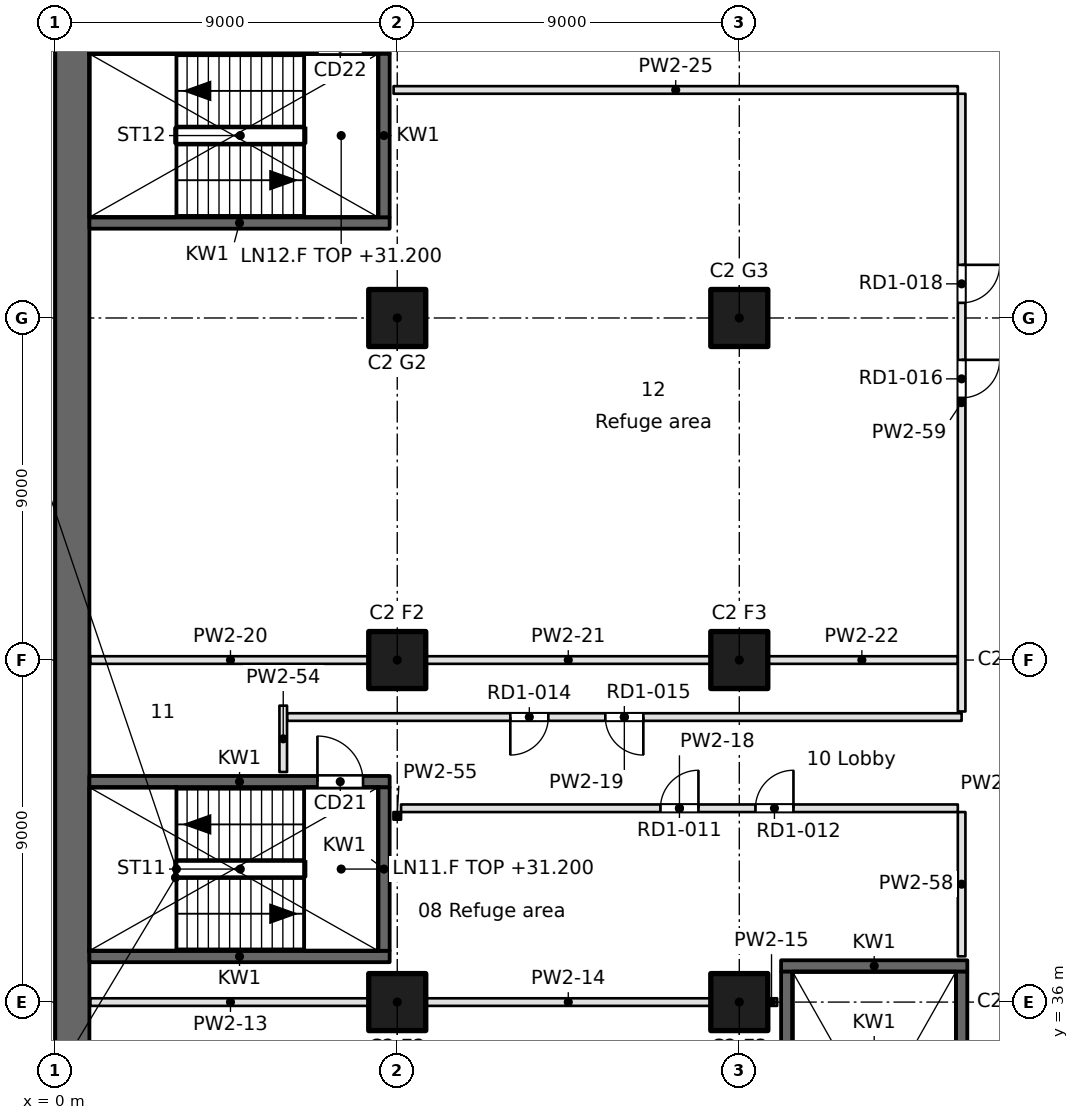
"""IFC4 building model, lengths in metres.
Left out: names, types, materials, properties, quantities, classifications, styles, units other than length and angle.
Written with IfcOpenShell. Run it as: python <this file> out.ifc"""

import sys

from ifc_helpers import new_model, si_unit, direction, frame, frame_2d, origin, origin_2d, place, context, subcontext, project, spatial, rectangle, extrude, element, fill, save


model = new_model("IFC4")
c1 = context("Model", 3, precision=1e-05, world=origin(), true_north=direction((0.0, 1.0)))
c2 = subcontext(c1, "Body", "Model", "MODEL_VIEW")
j1 = project(units=[si_unit("LENGTHUNIT", "METRE"), si_unit("PLANEANGLEUNIT", "RADIAN")], contexts=[c1])
p1 = place(None, origin())
s1 = spatial("IfcSite", under=j1, at=p1, CompositionType="ELEMENT")
p2 = place(p1, origin())
s2 = spatial("IfcBuilding", under=s1, at=p2, CompositionType="ELEMENT")
p3 = place(p2, frame((0.0, 0.0, 31.2)))
s3 = spatial("IfcBuildingStorey", under=s2, at=p3, CompositionType="ELEMENT", Elevation=31.2)
for number, where, z_axis, x_axis in (
    (1, (9.0, 36.0, 0.0), (0.0, 0.0, 1.0), (1.0, 0.0, 0.0)),
    (2, (9.0, 45.0, 0.0), (0.0, 0.0, 1.0), (1.0, 0.0, 0.0)),
    (3, (9.0, 54.0, 0.0), (0.0, 0.0, 1.0), (1.0, 0.0, 0.0)),
    (4, (18.0, 36.0, 0.0), (0.0, 0.0, 1.0), (1.0, 0.0, 0.0)),
    (5, (18.0, 45.0, 0.0), (0.0, 0.0, 1.0), (1.0, 0.0, 0.0)),
    (6, (18.0, 54.0, 0.0), (0.0, 0.0, 1.0), (1.0, 0.0, 0.0)),
):
    element("IfcColumn", number, at=place(p3, frame(where, z_axis=z_axis, x_axis=x_axis)), inside=s3, PredefinedType="COLUMN", context=c2, shape_type="SweptSolid", body=[
        extrude(rectangle(XDim=1.5, YDim=1.5, at=origin_2d()), origin(), (0.0, 0.0, 1.0), 4.6),
    ])
p4 = place(p3, frame((0.45, 94.5, 0.0), z_axis=(0.0, 0.0, 1.0), x_axis=(0.0, -1.0, 0.0)))
e7 = element("IfcWall", 7, at=p4, inside=s3, PredefinedType="SHEAR", context=c2, shape_type="SweptSolid", body=[
    extrude(rectangle(XDim=66.085, YDim=0.9, at=frame_2d((33.042, 0.0))), origin(), (0.0, 0.0, 1.0), 4.6),
])
p5 = place(p3, frame((19.1, 36.95, -0.45), z_axis=(0.0, 0.0, 1.0), x_axis=(1.0, 0.0, 0.0)))
e8 = element("IfcWall", 8, at=p5, inside=s3, PredefinedType="SOLIDWALL", context=c2, shape_type="SweptSolid", body=[
    extrude(rectangle(XDim=4.9, YDim=0.3, at=frame_2d((2.45, 0.0))), origin(), (0.0, 0.0, 1.0), 4.65),
])
p6 = place(p3, frame((0.9, 37.2, -0.45), z_axis=(0.0, 0.0, 1.0), x_axis=(1.0, 0.0, 0.0)))
e9 = element("IfcWall", 9, at=p6, inside=s3, PredefinedType="SOLIDWALL", context=c2, shape_type="SweptSolid", body=[
    extrude(rectangle(XDim=7.9, YDim=0.3, at=frame_2d((3.95, 0.0))), origin(), (0.0, 0.0, 1.0), 4.65),
])
p7 = place(p3, frame((0.9, 41.8, -0.45), z_axis=(0.0, 0.0, 1.0), x_axis=(1.0, 0.0, 0.0)))
e10 = element("IfcWall", 10, at=p7, inside=s3, PredefinedType="SOLIDWALL", context=c2, shape_type="SweptSolid", body=[
    extrude(rectangle(XDim=7.9, YDim=0.3, at=frame_2d((3.95, 0.0))), origin(), (0.0, 0.0, 1.0), 4.65),
])
p8 = place(p7, frame((6.0, 0.0, 0.45)))
e11 = element("IfcOpeningElement", 11, at=p8, cuts=e10, PredefinedType="OPENING", context=c2, shape_type="SweptSolid", body=[
    extrude(rectangle(XDim=1.2, YDim=2.1, at=frame_2d((0.6, 1.05))), frame((0.0, 0.15, 0.0), z_axis=(0.0, -1.0, 0.0), x_axis=(1.0, 0.0, 0.0)), (0.0, 0.0, 1.0), 0.3),
])
p9 = place(p3, frame((0.9, 56.5, -0.45), z_axis=(0.0, 0.0, 1.0), x_axis=(1.0, 0.0, 0.0)))
e12 = element("IfcWall", 12, at=p9, inside=s3, PredefinedType="SOLIDWALL", context=c2, shape_type="SweptSolid", body=[
    extrude(rectangle(XDim=7.9, YDim=0.3, at=frame_2d((3.95, 0.0))), origin(), (0.0, 0.0, 1.0), 4.65),
])
p10 = place(p3, frame((0.9, 61.1, -0.45), z_axis=(0.0, 0.0, 1.0), x_axis=(1.0, 0.0, 0.0)))
e13 = element("IfcWall", 13, at=p10, inside=s3, PredefinedType="SOLIDWALL", context=c2, shape_type="SweptSolid", body=[
    extrude(rectangle(XDim=7.9, YDim=0.3, at=frame_2d((3.95, 0.0))), origin(), (0.0, 0.0, 1.0), 4.65),
])
p11 = place(p10, frame((6.0, 0.0, 0.45)))
e14 = element("IfcOpeningElement", 14, at=p11, cuts=e13, PredefinedType="OPENING", context=c2, shape_type="SweptSolid", body=[
    extrude(rectangle(XDim=1.2, YDim=2.1, at=frame_2d((0.6, 1.05))), frame((0.0, 0.15, 0.0), z_axis=(0.0, -1.0, 0.0), x_axis=(1.0, 0.0, 0.0)), (0.0, 0.0, 1.0), 0.3),
])
p12 = place(p3, frame((8.65, 37.35, -0.45), z_axis=(0.0, 0.0, 1.0), x_axis=(0.0, 1.0, 0.0)))
e15 = element("IfcWall", 15, at=p12, inside=s3, PredefinedType="SOLIDWALL", context=c2, shape_type="SweptSolid", body=[
    extrude(rectangle(XDim=4.3, YDim=0.3, at=frame_2d((2.15, 0.0))), origin(), (0.0, 0.0, 1.0), 4.65),
])
p13 = place(p3, frame((8.65, 56.65, -0.45), z_axis=(0.0, 0.0, 1.0), x_axis=(0.0, 1.0, 0.0)))
e16 = element("IfcWall", 16, at=p13, inside=s3, PredefinedType="SOLIDWALL", context=c2, shape_type="SweptSolid", body=[
    extrude(rectangle(XDim=4.3, YDim=0.3, at=frame_2d((2.15, 0.0))), origin(), (0.0, 0.0, 1.0), 4.65),
])
p14 = place(p3, frame((19.25, 29.2, -0.45), z_axis=(0.0, 0.0, 1.0), x_axis=(0.0, 1.0, 0.0)))
e17 = element("IfcWall", 17, at=p14, inside=s3, PredefinedType="SOLIDWALL", context=c2, shape_type="SweptSolid", body=[
    extrude(rectangle(XDim=7.6, YDim=0.3, at=frame_2d((3.8, 0.0))), origin(), (0.0, 0.0, 1.0), 4.65),
])
p15 = place(p3, frame((23.85, 29.2, -0.45), z_axis=(0.0, 0.0, 1.0), x_axis=(0.0, 1.0, 0.0)))
e18 = element("IfcWall", 18, at=p15, inside=s3, PredefinedType="SOLIDWALL", context=c2, shape_type="SweptSolid", body=[
    extrude(rectangle(XDim=7.6, YDim=0.3, at=frame_2d((3.8, 0.0))), origin(), (0.0, 0.0, 1.0), 4.65),
])
p16 = place(p15, frame((0.375, 0.0, 0.45)))
e19 = element("IfcOpeningElement", 19, at=p16, cuts=e18, PredefinedType="OPENING", context=c2, shape_type="SweptSolid", body=[
    extrude(rectangle(XDim=1.2, YDim=2.1, at=frame_2d((0.6, 1.05))), frame((0.0, 0.15, 0.0), z_axis=(0.0, -1.0, 0.0), x_axis=(1.0, 0.0, 0.0)), (0.0, 0.0, 1.0), 0.3),
])
p17 = place(p3, frame((0.924, 36.0, 0.0), z_axis=(0.0, 0.0, 1.0), x_axis=(1.0, 0.0, 0.0)))
e20 = element("IfcWall", 20, at=p17, inside=s3, PredefinedType="PARTITIONING", context=c2, shape_type="SweptSolid", body=[
    extrude(rectangle(XDim=7.376, YDim=0.2, at=frame_2d((3.688, 0.0))), origin(), (0.0, 0.0, 1.0), 4.2),
])
p18 = place(p3, frame((9.7, 36.0, 0.0), z_axis=(0.0, 0.0, 1.0), x_axis=(1.0, 0.0, 0.0)))
e21 = element("IfcWall", 21, at=p18, inside=s3, PredefinedType="PARTITIONING", context=c2, shape_type="SweptSolid", body=[
    extrude(rectangle(XDim=7.6, YDim=0.2, at=frame_2d((3.8, 0.0))), origin(), (0.0, 0.0, 1.0), 4.2),
])
p19 = place(p3, frame((18.7, 36.0, 0.0), z_axis=(0.0, 0.0, 1.0), x_axis=(1.0, 0.0, 0.0)))
e22 = element("IfcWall", 22, at=p19, inside=s3, PredefinedType="PARTITIONING", context=c2, shape_type="SweptSolid", body=[
    extrude(rectangle(XDim=0.296, YDim=0.2, at=frame_2d((0.148, 0.0))), origin(), (0.0, 0.0, 1.0), 4.2),
])
p20 = place(p3, frame((23.75, 41.1, 0.0), z_axis=(0.0, 0.0, 1.0), x_axis=(-1.0, 0.0, 0.0)))
e23 = element("IfcWall", 23, at=p20, inside=s3, PredefinedType="PARTITIONING", context=c2, shape_type="SweptSolid", body=[
    extrude(rectangle(XDim=14.65, YDim=0.2, at=frame_2d((7.325, 0.0))), origin(), (0.0, 0.0, 1.0), 4.2),
])
p21 = place(p20, frame((6.825, 0.0, 0.0)))
e24 = element("IfcOpeningElement", 24, at=p21, cuts=e23, PredefinedType="OPENING", context=c2, shape_type="SweptSolid", body=[
    extrude(rectangle(XDim=1.0, YDim=2.1, at=frame_2d((0.5, 1.05))), frame((0.0, 0.1, 0.0), z_axis=(0.0, -1.0, 0.0), x_axis=(1.0, 0.0, 0.0)), (0.0, 0.0, 1.0), 0.2),
])
p22 = place(p20, frame((4.325, 0.0, 0.0)))
e25 = element("IfcOpeningElement", 25, at=p22, cuts=e23, PredefinedType="OPENING", context=c2, shape_type="SweptSolid", body=[
    extrude(rectangle(XDim=1.0, YDim=2.1, at=frame_2d((0.5, 1.05))), frame((0.0, 0.1, 0.0), z_axis=(0.0, -1.0, 0.0), x_axis=(1.0, 0.0, 0.0)), (0.0, 0.0, 1.0), 0.2),
])
p23 = place(p3, frame((6.1, 43.5, 0.0), z_axis=(0.0, 0.0, 1.0), x_axis=(1.0, 0.0, 0.0)))
e26 = element("IfcWall", 26, at=p23, inside=s3, PredefinedType="PARTITIONING", context=c2, shape_type="SweptSolid", body=[
    extrude(rectangle(XDim=17.75, YDim=0.2, at=frame_2d((8.875, 0.0))), origin(), (0.0, 0.0, 1.0), 4.2),
])
p24 = place(p23, frame((5.875, 0.0, 0.0)))
e27 = element("IfcOpeningElement", 27, at=p24, cuts=e26, PredefinedType="OPENING", context=c2, shape_type="SweptSolid", body=[
    extrude(rectangle(XDim=1.0, YDim=2.1, at=frame_2d((0.5, 1.05))), frame((0.0, 0.1, 0.0), z_axis=(0.0, -1.0, 0.0), x_axis=(1.0, 0.0, 0.0)), (0.0, 0.0, 1.0), 0.2),
])
p25 = place(p23, frame((8.375, 0.0, 0.0)))
e28 = element("IfcOpeningElement", 28, at=p25, cuts=e26, PredefinedType="OPENING", context=c2, shape_type="SweptSolid", body=[
    extrude(rectangle(XDim=1.0, YDim=2.1, at=frame_2d((0.5, 1.05))), frame((0.0, 0.1, 0.0), z_axis=(0.0, -1.0, 0.0), x_axis=(1.0, 0.0, 0.0)), (0.0, 0.0, 1.0), 0.2),
])
p26 = place(p3, frame((0.924, 45.0, 0.0), z_axis=(0.0, 0.0, 1.0), x_axis=(1.0, 0.0, 0.0)))
e29 = element("IfcWall", 29, at=p26, inside=s3, PredefinedType="PARTITIONING", context=c2, shape_type="SweptSolid", body=[
    extrude(rectangle(XDim=7.376, YDim=0.2, at=frame_2d((3.688, 0.0))), origin(), (0.0, 0.0, 1.0), 4.2),
])
p27 = place(p3, frame((9.7, 45.0, 0.0), z_axis=(0.0, 0.0, 1.0), x_axis=(1.0, 0.0, 0.0)))
e30 = element("IfcWall", 30, at=p27, inside=s3, PredefinedType="PARTITIONING", context=c2, shape_type="SweptSolid", body=[
    extrude(rectangle(XDim=7.6, YDim=0.2, at=frame_2d((3.8, 0.0))), origin(), (0.0, 0.0, 1.0), 4.2),
])
p28 = place(p3, frame((18.7, 45.0, 0.0), z_axis=(0.0, 0.0, 1.0), x_axis=(1.0, 0.0, 0.0)))
e31 = element("IfcWall", 31, at=p28, inside=s3, PredefinedType="PARTITIONING", context=c2, shape_type="SweptSolid", body=[
    extrude(rectangle(XDim=5.05, YDim=0.2, at=frame_2d((2.525, 0.0))), origin(), (0.0, 0.0, 1.0), 4.2),
])
p29 = place(p3, frame((23.75, 60.0, 0.0), z_axis=(0.0, 0.0, 1.0), x_axis=(-1.0, 0.0, 0.0)))
e32 = element("IfcWall", 32, at=p29, inside=s3, PredefinedType="PARTITIONING", context=c2, shape_type="SweptSolid", body=[
    extrude(rectangle(XDim=14.846, YDim=0.2, at=frame_2d((7.423, 0.0))), origin(), (0.0, 0.0, 1.0), 4.2),
])
p30 = place(p3, frame((6.0, 42.054, 0.0), z_axis=(0.0, 0.0, 1.0), x_axis=(0.0, 1.0, 0.0)))
e33 = element("IfcWall", 33, at=p30, inside=s3, PredefinedType="PARTITIONING", context=c2, shape_type="SweptSolid", body=[
    extrude(rectangle(XDim=1.746, YDim=0.2, at=frame_2d((0.873, 0.0))), origin(), (0.0, 0.0, 1.0), 4.2),
])
p31 = place(p3, frame((9.0, 41.0, 0.0), z_axis=(0.0, 0.0, 1.0), x_axis=(0.0, -1.0, 0.0)))
e34 = element("IfcWall", 34, at=p31, inside=s3, PredefinedType="PARTITIONING", context=c2, shape_type="SweptSolid", body=[
    extrude(rectangle(XDim=0.2, YDim=0.2, at=frame_2d((0.1, 0.0))), origin(), (0.0, 0.0, 1.0), 4.2),
])
p32 = place(p3, frame((23.85, 37.204, 0.0), z_axis=(0.0, 0.0, 1.0), x_axis=(0.0, 1.0, 0.0)))
e35 = element("IfcWall", 35, at=p32, inside=s3, PredefinedType="PARTITIONING", context=c2, shape_type="SweptSolid", body=[
    extrude(rectangle(XDim=3.796, YDim=0.2, at=frame_2d((1.898, 0.0))), origin(), (0.0, 0.0, 1.0), 4.2),
])
p33 = place(p3, frame((23.85, 43.646, 0.0), z_axis=(0.0, 0.0, 1.0), x_axis=(0.0, 1.0, 0.0)))
e36 = element("IfcWall", 36, at=p33, inside=s3, PredefinedType="PARTITIONING", context=c2, shape_type="SweptSolid", body=[
    extrude(rectangle(XDim=16.254, YDim=0.2, at=frame_2d((8.127, 0.0))), origin(), (0.0, 0.0, 1.0), 4.2),
])
p34 = place(p33, frame((8.252, 0.0, 0.0)))
e37 = element("IfcOpeningElement", 37, at=p34, cuts=e36, PredefinedType="OPENING", context=c2, shape_type="SweptSolid", body=[
    extrude(rectangle(XDim=1.0, YDim=2.1, at=frame_2d((0.5, 1.05))), frame((0.0, 0.1, 0.0), z_axis=(0.0, -1.0, 0.0), x_axis=(1.0, 0.0, 0.0)), (0.0, 0.0, 1.0), 0.2),
])
p35 = place(p33, frame((10.752, 0.0, 0.0)))
e38 = element("IfcOpeningElement", 38, at=p35, cuts=e36, PredefinedType="OPENING", context=c2, shape_type="SweptSolid", body=[
    extrude(rectangle(XDim=1.0, YDim=2.1, at=frame_2d((0.5, 1.05))), frame((0.0, 0.1, 0.0), z_axis=(0.0, -1.0, 0.0), x_axis=(1.0, 0.0, 0.0)), (0.0, 0.0, 1.0), 0.2),
])
p36 = place(p8, origin())
e39 = element("IfcDoor", 39, at=p36, inside=s3, OperationType="SINGLE_SWING_LEFT", PredefinedType="DOOR", context=c2, shape_type="SweptSolid", body=[
    extrude(rectangle(XDim=1.2, YDim=2.1, at=frame_2d((0.6, 1.05))), frame((0.0, 0.025, 0.0), z_axis=(0.0, -1.0, 0.0), x_axis=(1.0, 0.0, 0.0)), (0.0, 0.0, 1.0), 0.05),
])
fill(e11, e39)
p37 = place(p21, frame((1.0, 0.0, 0.0), z_axis=(0.0, 0.0, 1.0), x_axis=(-1.0, 0.0, 0.0)))
e40 = element("IfcDoor", 40, at=p37, inside=s3, OperationType="SINGLE_SWING_RIGHT", PredefinedType="DOOR", context=c2, shape_type="SweptSolid", body=[
    extrude(rectangle(XDim=1.0, YDim=2.1, at=frame_2d((0.5, 1.05))), frame((0.0, 0.025, 0.0), z_axis=(0.0, -1.0, 0.0), x_axis=(1.0, 0.0, 0.0)), (0.0, 0.0, 1.0), 0.05),
])
fill(e24, e40)
p38 = place(p22, frame((1.0, 0.0, 0.0), z_axis=(0.0, 0.0, 1.0), x_axis=(-1.0, 0.0, 0.0)))
e41 = element("IfcDoor", 41, at=p38, inside=s3, OperationType="SINGLE_SWING_RIGHT", PredefinedType="DOOR", context=c2, shape_type="SweptSolid", body=[
    extrude(rectangle(XDim=1.0, YDim=2.1, at=frame_2d((0.5, 1.05))), frame((0.0, 0.025, 0.0), z_axis=(0.0, -1.0, 0.0), x_axis=(1.0, 0.0, 0.0)), (0.0, 0.0, 1.0), 0.05),
])
fill(e25, e41)
p39 = place(p24, frame((1.0, 0.0, 0.0), z_axis=(0.0, 0.0, 1.0), x_axis=(-1.0, 0.0, 0.0)))
e42 = element("IfcDoor", 42, at=p39, inside=s3, OperationType="SINGLE_SWING_RIGHT", PredefinedType="DOOR", context=c2, shape_type="SweptSolid", body=[
    extrude(rectangle(XDim=1.0, YDim=2.1, at=frame_2d((0.5, 1.05))), frame((0.0, 0.025, 0.0), z_axis=(0.0, -1.0, 0.0), x_axis=(1.0, 0.0, 0.0)), (0.0, 0.0, 1.0), 0.05),
])
fill(e27, e42)
p40 = place(p25, frame((1.0, 0.0, 0.0), z_axis=(0.0, 0.0, 1.0), x_axis=(-1.0, 0.0, 0.0)))
e43 = element("IfcDoor", 43, at=p40, inside=s3, OperationType="SINGLE_SWING_LEFT", PredefinedType="DOOR", context=c2, shape_type="SweptSolid", body=[
    extrude(rectangle(XDim=1.0, YDim=2.1, at=frame_2d((0.5, 1.05))), frame((0.0, 0.025, 0.0), z_axis=(0.0, -1.0, 0.0), x_axis=(1.0, 0.0, 0.0)), (0.0, 0.0, 1.0), 0.05),
])
fill(e28, e43)
p41 = place(p34, frame((1.0, 0.0, 0.0), z_axis=(0.0, 0.0, 1.0), x_axis=(-1.0, 0.0, 0.0)))
e44 = element("IfcDoor", 44, at=p41, inside=s3, OperationType="SINGLE_SWING_LEFT", PredefinedType="DOOR", context=c2, shape_type="SweptSolid", body=[
    extrude(rectangle(XDim=1.0, YDim=2.1, at=frame_2d((0.5, 1.05))), frame((0.0, 0.025, 0.0), z_axis=(0.0, -1.0, 0.0), x_axis=(1.0, 0.0, 0.0)), (0.0, 0.0, 1.0), 0.05),
])
fill(e37, e44)
p42 = place(p35, frame((1.0, 0.0, 0.0), z_axis=(0.0, 0.0, 1.0), x_axis=(-1.0, 0.0, 0.0)))
e45 = element("IfcDoor", 45, at=p42, inside=s3, OperationType="SINGLE_SWING_LEFT", PredefinedType="DOOR", context=c2, shape_type="SweptSolid", body=[
    extrude(rectangle(XDim=1.0, YDim=2.1, at=frame_2d((0.5, 1.05))), frame((0.0, 0.025, 0.0), z_axis=(0.0, -1.0, 0.0), x_axis=(1.0, 0.0, 0.0)), (0.0, 0.0, 1.0), 0.05),
])
fill(e38, e45)
save(model, sys.argv[1])
